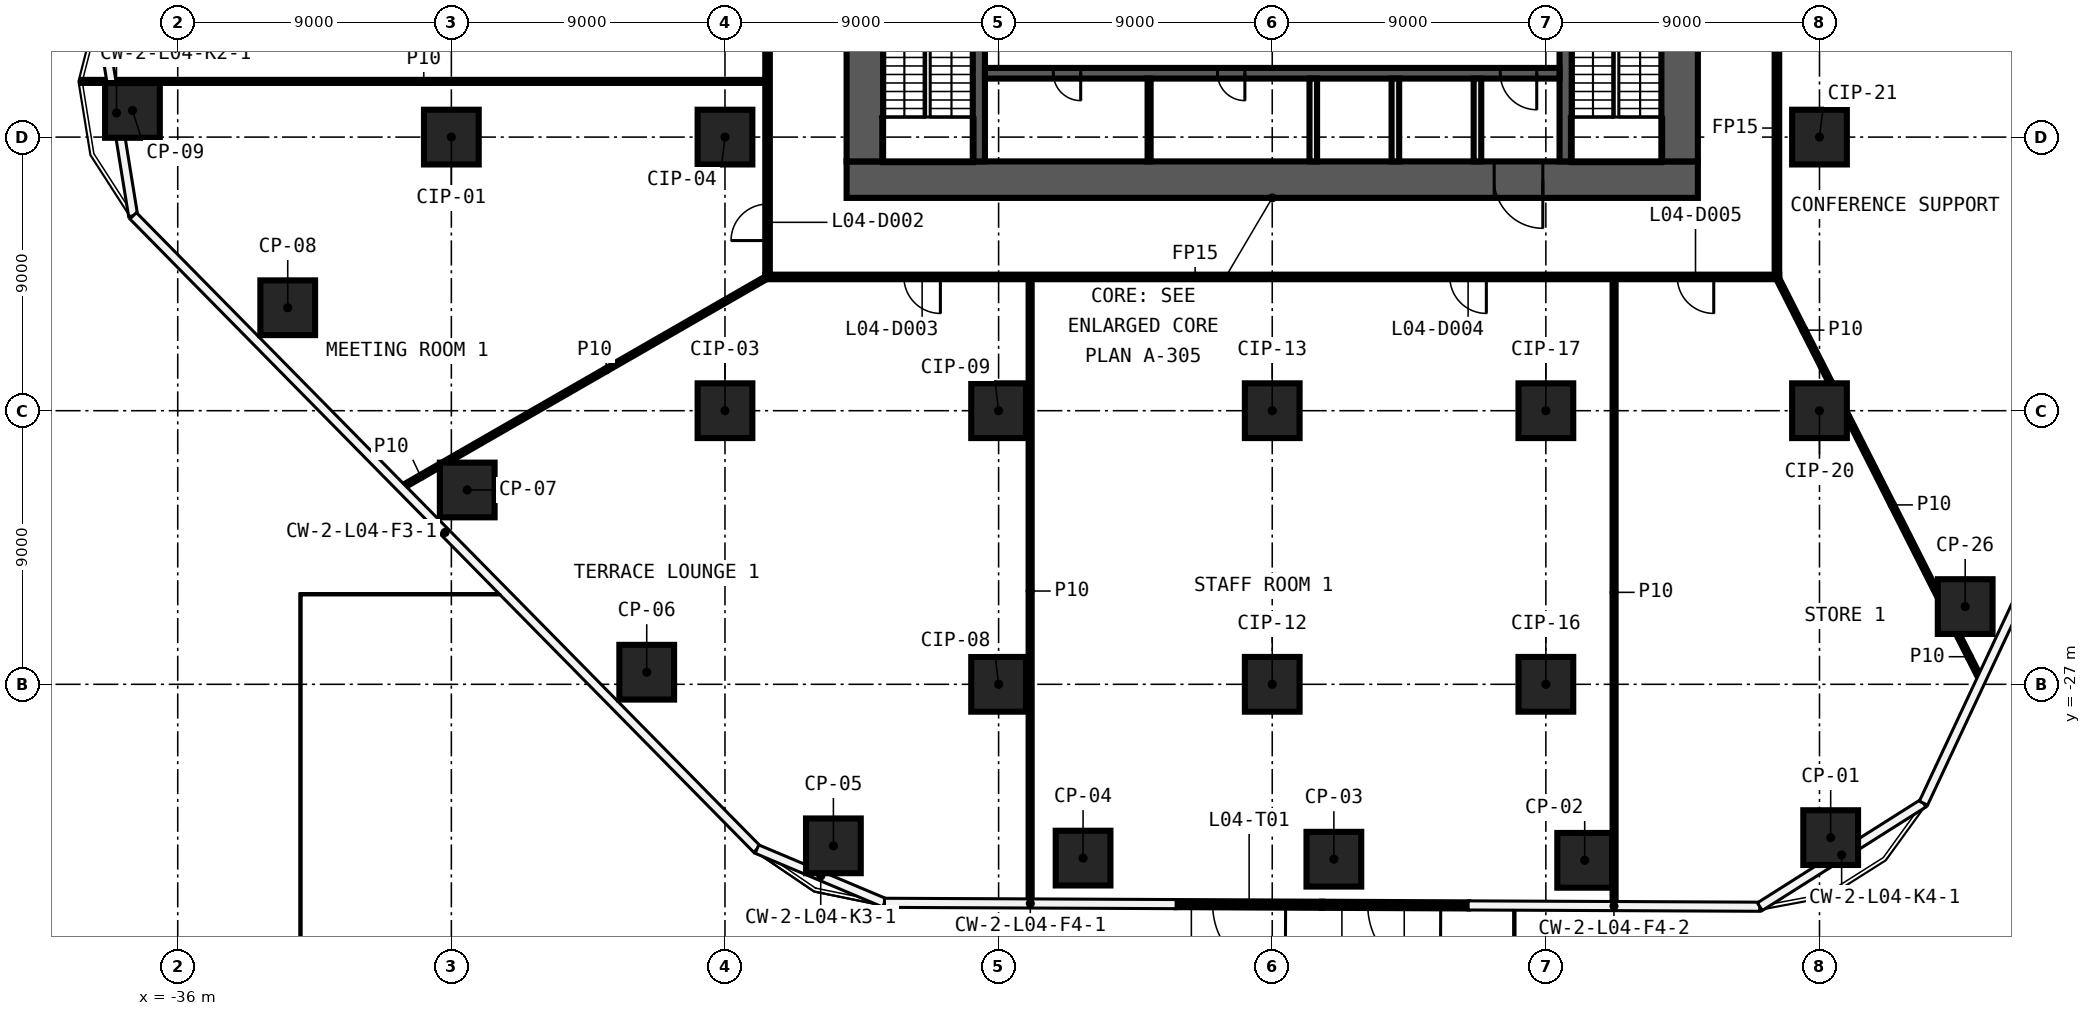
"""IFC4 building model, lengths in metres.
Left out: names, types, materials, properties, quantities, classifications, styles, units other than length and angle.
Written with IfcOpenShell. Run it as: python <this file> out.ifc"""

import sys

from ifc_helpers import new_model, si_unit, direction, frame, frame_2d, origin, origin_2d, place, context, subcontext, project, spatial, rectangle, extrude, element, fill, save


model = new_model("IFC4")
c1 = context("Model", 3, precision=1e-05, world=origin(), true_north=direction((0.0, 1.0)))
c2 = subcontext(c1, "Body", "Model", "MODEL_VIEW")
j1 = project(units=[si_unit("LENGTHUNIT", "METRE"), si_unit("PLANEANGLEUNIT", "RADIAN")], contexts=[c1])
p1 = place(None, origin())
s1 = spatial("IfcSite", under=j1, at=p1, CompositionType="ELEMENT")
p2 = place(p1, origin())
s2 = spatial("IfcBuilding", under=s1, at=p2, CompositionType="ELEMENT")
p3 = place(p2, frame((0.0, 0.0, 33.0)))
s3 = spatial("IfcBuildingStorey", under=s2, at=p3, CompositionType="ELEMENT", Elevation=33.0)
for number, where, z_axis, x_axis in (
    (1, (18.368, -32.043, 0.0), (0.0, 0.0, 1.0), (1.0, 0.0, 0.0)),
    (2, (10.277, -32.79, 0.0), (0.0, 0.0, 1.0), (1.0, 0.0, 0.0)),
    (3, (2.027, -32.753, 0.0), (0.0, 0.0, 1.0), (1.0, 0.0, 0.0)),
    (4, (-6.222, -32.717, 0.0), (0.0, 0.0, 1.0), (1.0, 0.0, 0.0)),
    (5, (-14.434, -32.313, 0.0), (0.0, 0.0, 1.0), (1.0, 0.0, 0.0)),
    (6, (-20.574, -26.602, 0.0), (0.0, 0.0, 1.0), (1.0, 0.0, 0.0)),
    (7, (-26.478, -20.608, 0.0), (0.0, 0.0, 1.0), (1.0, 0.0, 0.0)),
    (8, (-32.382, -14.613, 0.0), (0.0, 0.0, 1.0), (1.0, 0.0, 0.0)),
    (9, (-37.489, -8.123, 0.0), (0.0, 0.0, 1.0), (1.0, 0.0, 0.0)),
    (10, (22.792, -24.443, 0.0), (0.0, 0.0, 1.0), (1.0, 0.0, 0.0)),
    (11, (-27.0, -9.0, 0.0), (0.0, 0.0, 1.0), (1.0, 0.0, 0.0)),
    (12, (-18.0, -18.0, 0.0), (0.0, 0.0, 1.0), (1.0, 0.0, 0.0)),
    (13, (-18.0, -9.0, 0.0), (0.0, 0.0, 1.0), (1.0, 0.0, 0.0)),
    (14, (-9.0, -27.0, 0.0), (0.0, 0.0, 1.0), (1.0, 0.0, 0.0)),
    (15, (-9.0, -18.0, 0.0), (0.0, 0.0, 1.0), (1.0, 0.0, 0.0)),
    (16, (0.0, -27.0, 0.0), (0.0, 0.0, 1.0), (1.0, 0.0, 0.0)),
    (17, (0.0, -18.0, 0.0), (0.0, 0.0, 1.0), (1.0, 0.0, 0.0)),
    (18, (9.0, -27.0, 0.0), (0.0, 0.0, 1.0), (1.0, 0.0, 0.0)),
    (19, (9.0, -18.0, 0.0), (0.0, 0.0, 1.0), (1.0, 0.0, 0.0)),
    (20, (18.0, -18.0, 0.0), (0.0, 0.0, 1.0), (1.0, 0.0, 0.0)),
    (21, (18.0, -9.0, 0.0), (0.0, 0.0, 1.0), (1.0, 0.0, 0.0)),
):
    element("IfcColumn", number, at=place(p3, frame(where, z_axis=z_axis, x_axis=x_axis)), inside=s3, PredefinedType="COLUMN", context=c2, shape_type="SweptSolid", body=[
        extrude(rectangle(XDim=1.8, YDim=1.8, at=origin_2d()), origin(), (0.0, 0.0, 1.0), 4.6),
    ])
p4 = place(p3, frame((16.675, -13.6, 0.0), z_axis=(0.0, 0.0, 1.0), x_axis=(-1.0, 0.0, 0.0)))
e22 = element("IfcWall", 22, at=p4, inside=s3, PredefinedType="PARTITIONING", context=c2, shape_type="SweptSolid", body=[
    extrude(rectangle(XDim=33.35, YDim=0.15, at=frame_2d((16.675, 0.0))), origin(), (0.0, 0.0, 1.0), 4.6),
])
p5 = place(p4, frame((27.59, 0.0, 0.0)))
e23 = element("IfcOpeningElement", 23, at=p5, cuts=e22, PredefinedType="OPENING", context=c2, shape_type="SweptSolid", body=[
    extrude(rectangle(XDim=1.2, YDim=2.1, at=frame_2d((0.6, 1.05))), frame((0.0, 0.085, 0.0), z_axis=(0.0, -1.0, 0.0), x_axis=(1.0, 0.0, 0.0)), (0.0, 0.0, 1.0), 0.17),
])
p6 = place(p4, frame((9.633, 0.0, 0.0)))
e24 = element("IfcOpeningElement", 24, at=p6, cuts=e22, PredefinedType="OPENING", context=c2, shape_type="SweptSolid", body=[
    extrude(rectangle(XDim=1.2, YDim=2.1, at=frame_2d((0.6, 1.05))), frame((0.0, 0.085, 0.0), z_axis=(0.0, -1.0, 0.0), x_axis=(1.0, 0.0, 0.0)), (0.0, 0.0, 1.0), 0.17),
])
p7 = place(p4, frame((2.153, 0.0, 0.0)))
e25 = element("IfcOpeningElement", 25, at=p7, cuts=e22, PredefinedType="OPENING", context=c2, shape_type="SweptSolid", body=[
    extrude(rectangle(XDim=1.2, YDim=2.1, at=frame_2d((0.6, 1.05))), frame((0.0, 0.085, 0.0), z_axis=(0.0, -1.0, 0.0), x_axis=(1.0, 0.0, 0.0)), (0.0, 0.0, 1.0), 0.17),
])
p8 = place(p3, frame((-39.14, -7.168, 0.0), z_axis=(0.0, 0.0, 1.0), x_axis=(1.0, 0.0, 0.0)))
e26 = element("IfcWall", 26, at=p8, inside=s3, PredefinedType="PARTITIONING", context=c2, shape_type="SweptSolid", body=[
    extrude(rectangle(XDim=22.465, YDim=0.1, at=frame_2d((11.232, 0.0))), origin(), (0.0, 0.0, 1.0), 4.6),
])
p9 = place(p3, frame((-28.637, -20.524, 0.0), z_axis=(0.0, 0.0, 1.0), x_axis=(0.866750138861, 0.49874261577, 0.0)))
e27 = element("IfcWall", 27, at=p9, inside=s3, PredefinedType="PARTITIONING", context=c2, shape_type="SweptSolid", body=[
    extrude(rectangle(XDim=1.453, YDim=0.1, at=frame_2d((0.727, 0.0))), origin(), (0.0, 0.0, 1.0), 4.6),
])
p10 = place(p3, frame((-27.218, -19.708, 0.0), z_axis=(0.0, 0.0, 1.0), x_axis=(0.866810688847, 0.498637372948, 0.0)))
e28 = element("IfcWall", 28, at=p10, inside=s3, PredefinedType="PARTITIONING", context=c2, shape_type="SweptSolid", body=[
    extrude(rectangle(XDim=12.25, YDim=0.1, at=frame_2d((6.125, 0.0))), origin(), (0.0, 0.0, 1.0), 4.6),
])
p11 = place(p3, frame((16.6, 13.525, 0.0), z_axis=(0.0, 0.0, 1.0), x_axis=(0.0, -1.0, 0.0)))
e29 = element("IfcWall", 29, at=p11, inside=s3, PredefinedType="PARTITIONING", context=c2, shape_type="SweptSolid", body=[
    extrude(rectangle(XDim=27.05, YDim=0.15, at=frame_2d((13.525, 0.0))), origin(), (0.0, 0.0, 1.0), 4.6),
])
p12 = place(p11, frame((16.006, 0.0, 0.0)))
e30 = element("IfcOpeningElement", 30, at=p12, cuts=e29, PredefinedType="OPENING", context=c2, shape_type="SweptSolid", body=[
    extrude(rectangle(XDim=1.2, YDim=2.1, at=frame_2d((0.6, 1.05))), frame((0.0, 0.085, 0.0), z_axis=(0.0, -1.0, 0.0), x_axis=(1.0, 0.0, 0.0)), (0.0, 0.0, 1.0), 0.17),
])
p13 = place(p11, frame((7.745, 0.0, 0.0)))
e31 = element("IfcOpeningElement", 31, at=p13, cuts=e29, PredefinedType="OPENING", context=c2, shape_type="SweptSolid", body=[
    extrude(rectangle(XDim=1.2, YDim=2.1, at=frame_2d((0.6, 1.05))), frame((0.0, 0.085, 0.0), z_axis=(0.0, -1.0, 0.0), x_axis=(1.0, 0.0, 0.0)), (0.0, 0.0, 1.0), 0.17),
])
p14 = place(p3, frame((11.244, -34.275, 0.0), z_axis=(0.0, 0.0, 1.0), x_axis=(0.0, 1.0, 0.0)))
e32 = element("IfcWall", 32, at=p14, inside=s3, PredefinedType="PARTITIONING", context=c2, shape_type="SweptSolid", body=[
    extrude(rectangle(XDim=20.6, YDim=0.1, at=frame_2d((10.3, 0.0))), origin(), (0.0, 0.0, 1.0), 4.6),
])
p15 = place(p3, frame((-7.963, -34.189, 0.0), z_axis=(0.0, 0.0, 1.0), x_axis=(0.0, 1.0, 0.0)))
e33 = element("IfcWall", 33, at=p15, inside=s3, PredefinedType="PARTITIONING", context=c2, shape_type="SweptSolid", body=[
    extrude(rectangle(XDim=20.514, YDim=0.1, at=frame_2d((10.257, 0.0))), origin(), (0.0, 0.0, 1.0), 4.6),
])
p16 = place(p3, frame((-16.6, -13.525, 0.0), z_axis=(0.0, 0.0, 1.0), x_axis=(0.0, 1.0, 0.0)))
e34 = element("IfcWall", 34, at=p16, inside=s3, PredefinedType="PARTITIONING", context=c2, shape_type="SweptSolid", body=[
    extrude(rectangle(XDim=27.05, YDim=0.15, at=frame_2d((13.525, 0.0))), origin(), (0.0, 0.0, 1.0), 4.6),
])
p17 = place(p16, frame((16.028, 0.0, 0.0)))
e35 = element("IfcOpeningElement", 35, at=p17, cuts=e34, PredefinedType="OPENING", context=c2, shape_type="SweptSolid", body=[
    extrude(rectangle(XDim=1.2, YDim=2.1, at=frame_2d((0.6, 1.05))), frame((0.0, 0.085, 0.0), z_axis=(0.0, -1.0, 0.0), x_axis=(1.0, 0.0, 0.0)), (0.0, 0.0, 1.0), 0.17),
])
p18 = place(p16, frame((1.121, 0.0, 0.0)))
e36 = element("IfcOpeningElement", 36, at=p18, cuts=e34, PredefinedType="OPENING", context=c2, shape_type="SweptSolid", body=[
    extrude(rectangle(XDim=1.2, YDim=2.1, at=frame_2d((0.6, 1.05))), frame((0.0, 0.085, 0.0), z_axis=(0.0, -1.0, 0.0), x_axis=(1.0, 0.0, 0.0)), (0.0, 0.0, 1.0), 0.17),
])
p19 = place(p16, frame((24.705, 0.0, 0.0)))
e37 = element("IfcOpeningElement", 37, at=p19, cuts=e34, PredefinedType="OPENING", context=c2, shape_type="SweptSolid", body=[
    extrude(rectangle(XDim=1.2, YDim=2.1, at=frame_2d((0.6, 1.05))), frame((0.0, 0.085, 0.0), z_axis=(0.0, -1.0, 0.0), x_axis=(1.0, 0.0, 0.0)), (0.0, 0.0, 1.0), 0.17),
])
p20 = place(p3, frame((16.6, -13.6, 0.0), z_axis=(0.0, 0.0, 1.0), x_axis=(0.451663698234, -0.892188266958, 0.0)))
e38 = element("IfcWall", 38, at=p20, inside=s3, PredefinedType="PARTITIONING", context=c2, shape_type="SweptSolid", body=[
    extrude(rectangle(XDim=3.923, YDim=0.1, at=frame_2d((1.961, 0.0))), origin(), (0.0, 0.0, 1.0), 4.6),
])
p21 = place(p3, frame((18.9, -18.143, 0.0), z_axis=(0.0, 0.0, 1.0), x_axis=(0.451674644957, -0.892182725176, 0.0)))
e39 = element("IfcWall", 39, at=p21, inside=s3, PredefinedType="PARTITIONING", context=c2, shape_type="SweptSolid", body=[
    extrude(rectangle(XDim=6.625, YDim=0.1, at=frame_2d((3.312, 0.0))), origin(), (0.0, 0.0, 1.0), 4.6),
])
p22 = place(p3, frame((22.545, -25.343, 0.0), z_axis=(0.0, 0.0, 1.0), x_axis=(0.451627018025, -0.892206835095, 0.0)))
e40 = element("IfcWall", 40, at=p22, inside=s3, PredefinedType="PARTITIONING", context=c2, shape_type="SweptSolid", body=[
    extrude(rectangle(XDim=1.68, YDim=0.1, at=frame_2d((0.84, 0.0))), origin(), (0.0, 0.0, 1.0), 4.6),
])
p23 = place(p3, frame((1.641, -34.252, 0.0), z_axis=(0.0, 0.0, 1.0), x_axis=(-0.999989990591, 0.004474228146, 0.0)))
e41 = element("IfcWall", 41, at=p23, inside=s3, PredefinedType="SOLIDWALL", context=c2, shape_type="SweptSolid", body=[
    extrude(rectangle(XDim=4.802, YDim=0.2, at=frame_2d((2.401, 0.0))), origin(), (0.0, 0.0, 1.0), 4.6),
])
p24 = place(p23, frame((1.201, 0.0, 0.0)))
e42 = element("IfcOpeningElement", 42, at=p24, cuts=e41, PredefinedType="OPENING", context=c2, shape_type="SweptSolid", body=[
    extrude(rectangle(XDim=2.4, YDim=2.4, at=frame_2d((1.2, 1.2))), frame((0.0, 0.11, 0.0), z_axis=(0.0, -1.0, 0.0), x_axis=(1.0, 0.0, 0.0)), (0.0, 0.0, 1.0), 0.22),
])
p25 = place(p3, frame((6.443, -34.273, 0.0), z_axis=(0.0, 0.0, 1.0), x_axis=(-0.999989990591, 0.004474228146, 0.0)))
e43 = element("IfcWall", 43, at=p25, inside=s3, PredefinedType="SOLIDWALL", context=c2, shape_type="SweptSolid", body=[
    extrude(rectangle(XDim=4.802, YDim=0.2, at=frame_2d((2.401, 0.0))), origin(), (0.0, 0.0, 1.0), 4.6),
])
p26 = place(p25, frame((0.901, 0.0, 0.0)))
e44 = element("IfcOpeningElement", 44, at=p26, cuts=e43, PredefinedType="OPENING", context=c2, shape_type="SweptSolid", body=[
    extrude(rectangle(XDim=2.4, YDim=2.4, at=frame_2d((1.2, 1.2))), frame((0.0, 0.11, 0.0), z_axis=(0.0, -1.0, 0.0), x_axis=(1.0, 0.0, 0.0)), (0.0, 0.0, 1.0), 0.22),
])
p27 = place(p3, frame((14.0, -10.4, 0.0), z_axis=(0.0, 0.0, 1.0), x_axis=(-1.0, 0.0, 0.0)))
e45 = element("IfcWall", 45, at=p27, inside=s3, PredefinedType="SHEAR", context=c2, shape_type="SweptSolid", body=[
    extrude(rectangle(XDim=28.0, YDim=1.2, at=frame_2d((14.0, 0.0))), origin(), (0.0, 0.0, 1.0), 4.6),
])
p28 = place(p27, frame((5.1, 0.0, 0.0)))
e46 = element("IfcOpeningElement", 46, at=p28, cuts=e45, PredefinedType="OPENING", context=c2, shape_type="SweptSolid", body=[
    extrude(rectangle(XDim=1.6, YDim=2.1, at=frame_2d((0.8, 1.05))), frame((0.0, 0.61, 0.0), z_axis=(0.0, -1.0, 0.0), x_axis=(1.0, 0.0, 0.0)), (0.0, 0.0, 1.0), 1.22),
])
for number, where, z_axis, x_axis in (
    (47, (13.4, 9.8, 0.0), (0.0, 0.0, 1.0), (0.0, -1.0, 0.0)),
    (48, (-13.4, -9.8, 0.0), (0.0, 0.0, 1.0), (0.0, 1.0, 0.0)),
):
    element("IfcWall", number, at=place(p3, frame(where, z_axis=z_axis, x_axis=x_axis)), inside=s3, PredefinedType="SHEAR", context=c2, shape_type="SweptSolid", body=[
        extrude(rectangle(XDim=19.6, YDim=1.2, at=frame_2d((9.8, 0.0))), origin(), (0.0, 0.0, 1.0), 4.6),
    ])
p29 = place(p3, frame((9.65, -2.3, 0.0), z_axis=(0.0, 0.0, 1.0), x_axis=(0.0, -1.0, 0.0)))
e49 = element("IfcWall", 49, at=p29, inside=s3, PredefinedType="SHEAR", context=c2, shape_type="SweptSolid", body=[
    extrude(rectangle(XDim=7.5, YDim=0.4, at=frame_2d((3.75, 0.0))), origin(), (0.0, 0.0, 1.0), 4.6),
])
p30 = place(p29, frame((1.2, 0.0, 0.0)))
e50 = element("IfcOpeningElement", 50, at=p30, cuts=e49, PredefinedType="OPENING", context=c2, shape_type="SweptSolid", body=[
    extrude(rectangle(XDim=1.2, YDim=2.1, at=frame_2d((0.6, 1.05))), frame((0.0, 0.21, 0.0), z_axis=(0.0, -1.0, 0.0), x_axis=(1.0, 0.0, 0.0)), (0.0, 0.0, 1.0), 0.42),
])
p31 = place(p3, frame((-9.65, -9.8, 0.0), z_axis=(0.0, 0.0, 1.0), x_axis=(0.0, 1.0, 0.0)))
e51 = element("IfcWall", 51, at=p31, inside=s3, PredefinedType="SHEAR", context=c2, shape_type="SweptSolid", body=[
    extrude(rectangle(XDim=7.5, YDim=0.4, at=frame_2d((3.75, 0.0))), origin(), (0.0, 0.0, 1.0), 4.6),
])
p32 = place(p31, frame((5.1, 0.0, 0.0)))
e52 = element("IfcOpeningElement", 52, at=p32, cuts=e51, PredefinedType="OPENING", context=c2, shape_type="SweptSolid", body=[
    extrude(rectangle(XDim=1.2, YDim=2.1, at=frame_2d((0.6, 1.05))), frame((0.0, 0.21, 0.0), z_axis=(0.0, -1.0, 0.0), x_axis=(1.0, 0.0, 0.0)), (0.0, 0.0, 1.0), 0.42),
])
p33 = place(p3, frame((9.45, -6.9, 0.0), z_axis=(0.0, 0.0, 1.0), x_axis=(-1.0, 0.0, 0.0)))
e53 = element("IfcWall", 53, at=p33, inside=s3, PredefinedType="SHEAR", context=c2, shape_type="SweptSolid", body=[
    extrude(rectangle(XDim=18.9, YDim=0.35, at=frame_2d((9.45, 0.0))), origin(), (0.0, 0.0, 1.0), 4.6),
])
p34 = place(p33, frame((0.75, 0.0, 0.0)))
e54 = element("IfcOpeningElement", 54, at=p34, cuts=e53, PredefinedType="OPENING", context=c2, shape_type="SweptSolid", body=[
    extrude(rectangle(XDim=1.2, YDim=2.1, at=frame_2d((0.6, 1.05))), frame((0.0, 0.185, 0.0), z_axis=(0.0, -1.0, 0.0), x_axis=(1.0, 0.0, 0.0)), (0.0, 0.0, 1.0), 0.37),
])
p35 = place(p33, frame((15.75, 0.0, 0.0)))
e55 = element("IfcOpeningElement", 55, at=p35, cuts=e53, PredefinedType="OPENING", context=c2, shape_type="SweptSolid", body=[
    extrude(rectangle(XDim=0.9, YDim=2.1, at=frame_2d((0.45, 1.05))), frame((0.0, 0.185, 0.0), z_axis=(0.0, -1.0, 0.0), x_axis=(1.0, 0.0, 0.0)), (0.0, 0.0, 1.0), 0.37),
])
p36 = place(p33, frame((10.35, 0.0, 0.0)))
e56 = element("IfcOpeningElement", 56, at=p36, cuts=e53, PredefinedType="OPENING", context=c2, shape_type="SweptSolid", body=[
    extrude(rectangle(XDim=0.9, YDim=2.1, at=frame_2d((0.45, 1.05))), frame((0.0, 0.185, 0.0), z_axis=(0.0, -1.0, 0.0), x_axis=(1.0, 0.0, 0.0)), (0.0, 0.0, 1.0), 0.37),
])
for number, where, z_axis, x_axis in (
    (57, (6.75, -9.8, 0.0), (0.0, 0.0, 1.0), (0.0, 1.0, 0.0)),
    (58, (4.05, -9.8, 0.0), (0.0, 0.0, 1.0), (0.0, 1.0, 0.0)),
    (59, (1.35, -9.8, 0.0), (0.0, 0.0, 1.0), (0.0, 1.0, 0.0)),
):
    element("IfcWall", number, at=place(p3, frame(where, z_axis=z_axis, x_axis=x_axis)), inside=s3, PredefinedType="SOLIDWALL", context=c2, shape_type="SweptSolid", body=[
        extrude(rectangle(XDim=2.725, YDim=0.25, at=frame_2d((1.363, 0.0))), origin(), (0.0, 0.0, 1.0), 4.6),
    ])
p37 = place(p3, frame((-4.05, -9.8, 0.0), z_axis=(0.0, 0.0, 1.0), x_axis=(0.0, 1.0, 0.0)))
e60 = element("IfcWall", 60, at=p37, inside=s3, PredefinedType="PARTITIONING", context=c2, shape_type="SweptSolid", body=[
    extrude(rectangle(XDim=2.725, YDim=0.1, at=frame_2d((1.363, 0.0))), origin(), (0.0, 0.0, 1.0), 4.6),
])
p38 = place(p18, origin())
e61 = element("IfcDoor", 61, at=p38, inside=s3, OperationType="SINGLE_SWING_LEFT", PredefinedType="DOOR", context=c2, shape_type="SweptSolid", body=[
    extrude(rectangle(XDim=1.2, YDim=2.1, at=frame_2d((0.6, 1.05))), frame((0.0, 0.025, 0.0), z_axis=(0.0, -1.0, 0.0), x_axis=(1.0, 0.0, 0.0)), (0.0, 0.0, 1.0), 0.05),
])
fill(e36, e61)
p39 = place(p5, origin())
e62 = element("IfcDoor", 62, at=p39, inside=s3, OperationType="SINGLE_SWING_RIGHT", PredefinedType="DOOR", context=c2, shape_type="SweptSolid", body=[
    extrude(rectangle(XDim=1.2, YDim=2.1, at=frame_2d((0.6, 1.05))), frame((0.0, 0.025, 0.0), z_axis=(0.0, -1.0, 0.0), x_axis=(1.0, 0.0, 0.0)), (0.0, 0.0, 1.0), 0.05),
])
fill(e23, e62)
p40 = place(p6, origin())
e63 = element("IfcDoor", 63, at=p40, inside=s3, OperationType="SINGLE_SWING_LEFT", PredefinedType="DOOR", context=c2, shape_type="SweptSolid", body=[
    extrude(rectangle(XDim=1.2, YDim=2.1, at=frame_2d((0.6, 1.05))), frame((0.0, 0.025, 0.0), z_axis=(0.0, -1.0, 0.0), x_axis=(1.0, 0.0, 0.0)), (0.0, 0.0, 1.0), 0.05),
])
fill(e24, e63)
p41 = place(p7, origin())
e64 = element("IfcDoor", 64, at=p41, inside=s3, OperationType="SINGLE_SWING_RIGHT", PredefinedType="DOOR", context=c2, shape_type="SweptSolid", body=[
    extrude(rectangle(XDim=1.2, YDim=2.1, at=frame_2d((0.6, 1.05))), frame((0.0, 0.025, 0.0), z_axis=(0.0, -1.0, 0.0), x_axis=(1.0, 0.0, 0.0)), (0.0, 0.0, 1.0), 0.05),
])
fill(e25, e64)
p42 = place(p24, origin())
e65 = element("IfcDoor", 65, at=p42, inside=s3, OperationType="SINGLE_SWING_LEFT", PredefinedType="DOOR", context=c2, shape_type="SweptSolid", body=[
    extrude(rectangle(XDim=2.4, YDim=2.4, at=frame_2d((1.2, 1.2))), frame((0.0, 0.025, 0.0), z_axis=(0.0, -1.0, 0.0), x_axis=(1.0, 0.0, 0.0)), (0.0, 0.0, 1.0), 0.05),
])
fill(e42, e65)
p43 = place(p26, origin())
e66 = element("IfcDoor", 66, at=p43, inside=s3, OperationType="SINGLE_SWING_LEFT", PredefinedType="DOOR", context=c2, shape_type="SweptSolid", body=[
    extrude(rectangle(XDim=2.4, YDim=2.4, at=frame_2d((1.2, 1.2))), frame((0.0, 0.025, 0.0), z_axis=(0.0, -1.0, 0.0), x_axis=(1.0, 0.0, 0.0)), (0.0, 0.0, 1.0), 0.05),
])
fill(e44, e66)
p44 = place(p28, origin())
e67 = element("IfcDoor", 67, at=p44, inside=s3, OperationType="DOUBLE_DOOR_SINGLE_SWING", PredefinedType="DOOR", context=c2, shape_type="SweptSolid", body=[
    extrude(rectangle(XDim=1.6, YDim=2.1, at=frame_2d((0.8, 1.05))), frame((0.0, 0.025, 0.0), z_axis=(0.0, -1.0, 0.0), x_axis=(1.0, 0.0, 0.0)), (0.0, 0.0, 1.0), 0.05),
])
fill(e46, e67)
p45 = place(p34, origin())
e68 = element("IfcDoor", 68, at=p45, inside=s3, OperationType="SINGLE_SWING_LEFT", PredefinedType="DOOR", context=c2, shape_type="SweptSolid", body=[
    extrude(rectangle(XDim=1.2, YDim=2.1, at=frame_2d((0.6, 1.05))), frame((0.0, 0.025, 0.0), z_axis=(0.0, -1.0, 0.0), x_axis=(1.0, 0.0, 0.0)), (0.0, 0.0, 1.0), 0.05),
])
fill(e54, e68)
p46 = place(p35, origin())
e69 = element("IfcDoor", 69, at=p46, inside=s3, OperationType="SINGLE_SWING_LEFT", PredefinedType="DOOR", context=c2, shape_type="SweptSolid", body=[
    extrude(rectangle(XDim=0.9, YDim=2.1, at=frame_2d((0.45, 1.05))), frame((0.0, 0.025, 0.0), z_axis=(0.0, -1.0, 0.0), x_axis=(1.0, 0.0, 0.0)), (0.0, 0.0, 1.0), 0.05),
])
fill(e55, e69)
p47 = place(p36, origin())
e70 = element("IfcDoor", 70, at=p47, inside=s3, OperationType="SINGLE_SWING_RIGHT", PredefinedType="DOOR", context=c2, shape_type="SweptSolid", body=[
    extrude(rectangle(XDim=0.9, YDim=2.1, at=frame_2d((0.45, 1.05))), frame((0.0, 0.025, 0.0), z_axis=(0.0, -1.0, 0.0), x_axis=(1.0, 0.0, 0.0)), (0.0, 0.0, 1.0), 0.05),
])
fill(e56, e70)
save(model, sys.argv[1])
